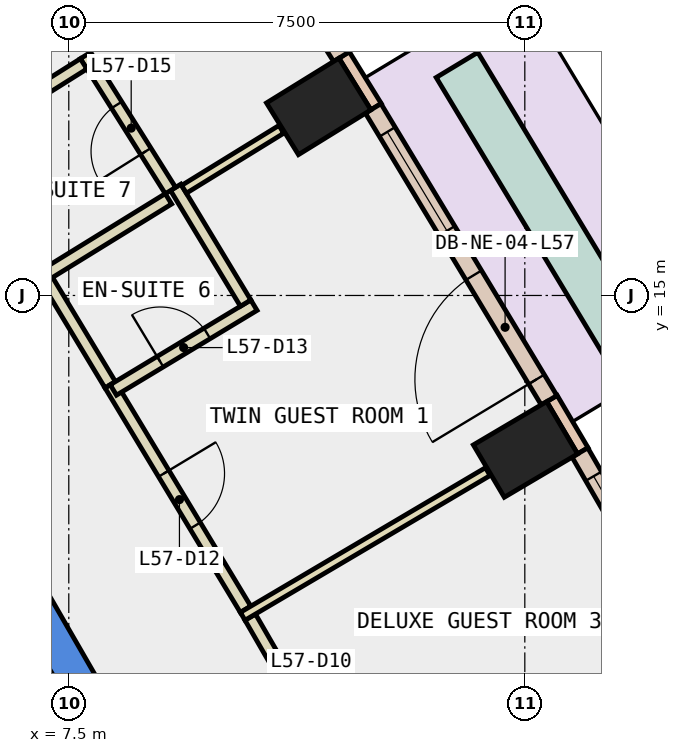
"""IFC4 building model, lengths in metres.
Left out: names, types, materials, properties, quantities, classifications, styles, units other than length and angle.
Written with IfcOpenShell. Run it as: python <this file> out.ifc"""

import sys

from ifc_helpers import new_model, si_unit, direction, frame, frame_2d, origin, origin_2d, place, context, subcontext, project, spatial, polyline, rectangle, outline, extrude, element, fill, save


model = new_model("IFC4")
c1 = context("Model", 3, precision=1e-05, world=origin(), true_north=direction((0.0, 1.0)))
c2 = subcontext(c1, "Body", "Model", "MODEL_VIEW")
j1 = project(units=[si_unit("LENGTHUNIT", "METRE"), si_unit("PLANEANGLEUNIT", "RADIAN")], contexts=[c1])
p1 = place(None, origin())
s1 = spatial("IfcSite", under=j1, at=p1, CompositionType="ELEMENT")
p2 = place(p1, origin())
s2 = spatial("IfcBuilding", under=s1, at=p2, CompositionType="ELEMENT")
p3 = place(p2, frame((0.0, 0.0, 252.2)))
s3 = spatial("IfcBuildingStorey", under=s2, at=p3, CompositionType="ELEMENT", Elevation=252.2)
for number, where, z_axis, x_axis in (
    (1, (15.011, 12.468, -0.34), (0.0, 0.0, 1.0), (-0.509, 0.861, 0.0)),
    (2, (11.61, 18.109, -0.34), (0.0, 0.0, 1.0), (-0.526, 0.851, 0.0)),
):
    element("IfcColumn", number, at=place(p3, frame(where, z_axis=z_axis, x_axis=x_axis)), inside=s3, PredefinedType="COLUMN", context=c2, shape_type="SweptSolid", body=[
        extrude(rectangle(XDim=1.0, YDim=1.4, at=origin_2d()), origin(), (0.0, 0.0, 1.0), 3.6),
    ])
p4 = place(p3, frame((0.0, 0.0, -0.34)))
e3 = element("IfcWall", 3, at=p4, inside=s3, PredefinedType="SHEAR", context=c2, shape_type="SweptSolid", body=[
    extrude(outline(polyline([(6.786, 10.747), (6.266, 10.447), (10.854, 2.5), (11.547, 2.5), (6.786, 10.747)])), origin(), (0.0, 0.0, 1.0), 3.6),
])
p5 = place(p3, frame((15.954, 12.445, 0.0), z_axis=(0.0, 0.0, 1.0), x_axis=(-0.508268432768, 0.861198699634, 0.0)))
e4 = element("IfcWall", 4, at=p5, inside=s3, PredefinedType="STANDARD", context=c2, shape_type="SweptSolid", body=[
    extrude(rectangle(XDim=1.0, YDim=0.2, at=frame_2d((0.5, 0.0))), origin(), (0.0, 0.0, 1.0), 3.26),
])
p6 = place(p3, frame((12.554, 18.104, 0.0), z_axis=(0.0, 0.0, 1.0), x_axis=(-0.525648735675, 0.850701714282, 0.0)))
e5 = element("IfcWall", 5, at=p6, inside=s3, PredefinedType="STANDARD", context=c2, shape_type="SweptSolid", body=[
    extrude(rectangle(XDim=1.0, YDim=0.2, at=frame_2d((0.5, 0.0))), origin(), (0.0, 0.0, 1.0), 3.26),
])
p7 = place(p3, frame((18.708, 7.566, 0.0), z_axis=(0.0, 0.0, 1.0), x_axis=(-0.500089564757, 0.865973687372, 0.0)))
e6 = element("IfcWall", 6, at=p7, inside=s3, PredefinedType="STANDARD", context=c2, shape_type="SweptSolid", body=[
    extrude(rectangle(XDim=5.603, YDim=0.3, at=frame_2d((2.802, 0.0))), origin(), (0.0, 0.0, 1.0), 3.26),
])
p8 = place(p7, frame((0.451, 0.0, 0.9)))
e7 = element("IfcOpeningElement", 7, at=p8, cuts=e6, PredefinedType="OPENING", context=c2, shape_type="SweptSolid", body=[
    extrude(rectangle(XDim=1.9, YDim=2.0, at=frame_2d((0.95, 1.0))), frame((0.0, 0.16, 0.0), z_axis=(0.0, -1.0, 0.0), x_axis=(1.0, 0.0, 0.0)), (0.0, 0.0, 1.0), 0.32),
])
p9 = place(p7, frame((3.252, 0.0, 0.9)))
e8 = element("IfcOpeningElement", 8, at=p9, cuts=e6, PredefinedType="OPENING", context=c2, shape_type="SweptSolid", body=[
    extrude(rectangle(XDim=1.9, YDim=2.0, at=frame_2d((0.95, 1.0))), frame((0.0, 0.16, 0.0), z_axis=(0.0, -1.0, 0.0), x_axis=(1.0, 0.0, 0.0)), (0.0, 0.0, 1.0), 0.32),
])
p10 = place(p3, frame((15.399, 13.277, 0.0), z_axis=(0.0, 0.0, 1.0), x_axis=(-0.516269519619, 0.856426169096, 0.0)))
e9 = element("IfcWall", 9, at=p10, inside=s3, PredefinedType="STANDARD", context=c2, shape_type="SweptSolid", body=[
    extrude(rectangle(XDim=5.603, YDim=0.3, at=frame_2d((2.802, 0.0))), origin(), (0.0, 0.0, 1.0), 3.26),
])
p11 = place(p10, frame((0.401, 0.0, 0.0)))
e10 = element("IfcOpeningElement", 10, at=p11, cuts=e9, PredefinedType="OPENING", context=c2, shape_type="SweptSolid", body=[
    extrude(rectangle(XDim=2.0, YDim=2.4, at=frame_2d((1.0, 1.2))), frame((0.0, 0.16, 0.0), z_axis=(0.0, -1.0, 0.0), x_axis=(1.0, 0.0, 0.0)), (0.0, 0.0, 1.0), 0.32),
])
p12 = place(p10, frame((3.253, 0.0, 0.9)))
e11 = element("IfcOpeningElement", 11, at=p12, cuts=e9, PredefinedType="OPENING", context=c2, shape_type="SweptSolid", body=[
    extrude(rectangle(XDim=1.9, YDim=2.0, at=frame_2d((0.95, 1.0))), frame((0.0, 0.16, 0.0), z_axis=(0.0, -1.0, 0.0), x_axis=(1.0, 0.0, 0.0)), (0.0, 0.0, 1.0), 0.32),
])
p13 = place(p3, frame((11.983, 18.926, 0.0), z_axis=(0.0, 0.0, 1.0), x_axis=(-0.532558226688, 0.846393369059, 0.0)))
e12 = element("IfcWall", 12, at=p13, inside=s3, PredefinedType="STANDARD", context=c2, shape_type="SweptSolid", body=[
    extrude(rectangle(XDim=5.637, YDim=0.3, at=frame_2d((2.818, 0.0))), origin(), (0.0, 0.0, 1.0), 3.26),
])
p14 = place(p13, frame((0.459, 0.0, 0.9)))
e13 = element("IfcOpeningElement", 13, at=p14, cuts=e12, PredefinedType="OPENING", context=c2, shape_type="SweptSolid", body=[
    extrude(rectangle(XDim=1.9, YDim=2.0, at=frame_2d((0.95, 1.0))), frame((0.0, 0.16, 0.0), z_axis=(0.0, -1.0, 0.0), x_axis=(1.0, 0.0, 0.0)), (0.0, 0.0, 1.0), 0.32),
])
p15 = place(p13, frame((3.278, 0.0, 0.9)))
e14 = element("IfcOpeningElement", 14, at=p15, cuts=e12, PredefinedType="OPENING", context=c2, shape_type="SweptSolid", body=[
    extrude(rectangle(XDim=1.9, YDim=2.0, at=frame_2d((0.95, 1.0))), frame((0.0, 0.16, 0.0), z_axis=(0.0, -1.0, 0.0), x_axis=(1.0, 0.0, 0.0)), (0.0, 0.0, 1.0), 0.32),
])
p16 = place(p3, frame((16.675, 14.163, 0.0), z_axis=(0.0, 0.0, 1.0), x_axis=(-0.516301759386, 0.856406733542, 0.0)))
e15 = element("IfcWall", 15, at=p16, inside=s3, PredefinedType="STANDARD", context=c2, shape_type="SweptSolid", body=[
    extrude(rectangle(XDim=5.404, YDim=0.8, at=frame_2d((2.702, 0.0))), origin(), (0.0, 0.0, 1.0), 0.8),
])
p17 = place(p3, frame((10.484, 9.71, 0.0), z_axis=(0.0, 0.0, 1.0), x_axis=(0.500034145141, -0.866005689181, 0.0)))
e16 = element("IfcWall", 16, at=p17, inside=s3, PredefinedType="PARTITIONING", context=c2, shape_type="SweptSolid", body=[
    extrude(rectangle(XDim=3.91, YDim=0.2, at=frame_2d((1.955, 0.0))), origin(), (0.0, 0.0, 1.0), 3.26),
])
p18 = place(p17, frame((1.505, 0.0, 0.0)))
e17 = element("IfcOpeningElement", 17, at=p18, cuts=e16, PredefinedType="OPENING", context=c2, shape_type="SweptSolid", body=[
    extrude(rectangle(XDim=1.0, YDim=2.1, at=frame_2d((0.5, 1.05))), frame((0.0, 0.11, 0.0), z_axis=(0.0, -1.0, 0.0), x_axis=(1.0, 0.0, 0.0)), (0.0, 0.0, 1.0), 0.22),
])
p19 = place(p3, frame((8.181, 13.532, 0.0), z_axis=(0.0, 0.0, 1.0), x_axis=(0.51625987265, -0.856431984393, 0.0)))
e18 = element("IfcWall", 18, at=p19, inside=s3, PredefinedType="PARTITIONING", context=c2, shape_type="SweptSolid", body=[
    extrude(rectangle(XDim=4.312, YDim=0.2, at=frame_2d((2.156, 0.0))), origin(), (0.0, 0.0, 1.0), 3.26),
])
p20 = place(p19, frame((1.706, 0.0, 0.0)))
e19 = element("IfcOpeningElement", 19, at=p20, cuts=e18, PredefinedType="OPENING", context=c2, shape_type="SweptSolid", body=[
    extrude(rectangle(XDim=1.0, YDim=2.1, at=frame_2d((0.5, 1.05))), frame((0.0, 0.11, 0.0), z_axis=(0.0, -1.0, 0.0), x_axis=(1.0, 0.0, 0.0)), (0.0, 0.0, 1.0), 0.22),
])
p21 = place(p3, frame((7.148, 15.245, 0.0), z_axis=(0.0, 0.0, 1.0), x_axis=(0.516361066184, -0.856370976463, 0.0)))
e20 = element("IfcWall", 20, at=p21, inside=s3, PredefinedType="PARTITIONING", context=c2, shape_type="SweptSolid", body=[
    extrude(rectangle(XDim=2.0, YDim=0.2, at=frame_2d((1.0, 0.0))), origin(), (0.0, 0.0, 1.0), 3.26),
])
p22 = place(p3, frame((5.766, 17.446, 0.0), z_axis=(0.0, 0.0, 1.0), x_axis=(0.532437006176, -0.846469629966, 0.0)))
e21 = element("IfcWall", 21, at=p22, inside=s3, PredefinedType="PARTITIONING", context=c2, shape_type="SweptSolid", body=[
    extrude(rectangle(XDim=2.599, YDim=0.2, at=frame_2d((1.299, 0.0))), origin(), (0.0, 0.0, 1.0), 3.26),
])
p23 = place(p3, frame((10.36, 9.724, 0.0), z_axis=(0.0, 0.0, 1.0), x_axis=(0.861211954005, 0.508245974188, 0.0)))
e22 = element("IfcWall", 22, at=p23, inside=s3, PredefinedType="PARTITIONING", context=c2, shape_type="SweptSolid", body=[
    extrude(rectangle(XDim=4.681, YDim=0.15, at=frame_2d((2.34, 0.0))), origin(), (0.0, 0.0, 1.0), 3.26),
])
p24 = place(p3, frame((8.233, 13.446, 0.0), z_axis=(0.0, 0.0, 1.0), x_axis=(0.856373825811, 0.516356340589, 0.0)))
e23 = element("IfcWall", 23, at=p24, inside=s3, PredefinedType="PARTITIONING", context=c2, shape_type="SweptSolid", body=[
    extrude(rectangle(XDim=2.7, YDim=0.2, at=frame_2d((1.35, 0.0))), origin(), (0.0, 0.0, 1.0), 3.26),
])
p25 = place(p24, frame((0.9, 0.0, 0.0)))
e24 = element("IfcOpeningElement", 24, at=p25, cuts=e23, PredefinedType="OPENING", context=c2, shape_type="SweptSolid", body=[
    extrude(rectangle(XDim=0.9, YDim=2.1, at=frame_2d((0.45, 1.05))), frame((0.0, 0.11, 0.0), z_axis=(0.0, -1.0, 0.0), x_axis=(1.0, 0.0, 0.0)), (0.0, 0.0, 1.0), 0.22),
])
p26 = place(p3, frame((10.408, 14.874, 0.0), z_axis=(0.0, 0.0, 1.0), x_axis=(-0.516768967276, 0.856124894195, 0.0)))
e25 = element("IfcWall", 25, at=p26, inside=s3, PredefinedType="PARTITIONING", context=c2, shape_type="SweptSolid", body=[
    extrude(rectangle(XDim=2.225, YDim=0.2, at=frame_2d((1.113, 0.0))), origin(), (0.0, 0.0, 1.0), 3.26),
])
p27 = place(p3, frame((9.395, 16.746, 0.0), z_axis=(0.0, 0.0, 1.0), x_axis=(0.851524542888, 0.524314745987, 0.0)))
e26 = element("IfcWall", 26, at=p27, inside=s3, PredefinedType="PARTITIONING", context=c2, shape_type="SweptSolid", body=[
    extrude(rectangle(XDim=1.88, YDim=0.15, at=frame_2d((0.94, 0.0))), origin(), (0.0, 0.0, 1.0), 3.26),
])
p28 = place(p3, frame((7.097, 15.33, 0.0), z_axis=(0.0, 0.0, 1.0), x_axis=(0.851207242031, 0.524829716302, 0.0)))
e27 = element("IfcWall", 27, at=p28, inside=s3, PredefinedType="PARTITIONING", context=c2, shape_type="SweptSolid", body=[
    extrude(rectangle(XDim=2.399, YDim=0.2, at=frame_2d((1.199, 0.0))), origin(), (0.0, 0.0, 1.0), 3.26),
])
p29 = place(p3, frame((9.172, 16.725, 0.0), z_axis=(0.0, 0.0, 1.0), x_axis=(-0.532329646536, 0.846537150643, 0.0)))
e28 = element("IfcWall", 28, at=p29, inside=s3, PredefinedType="PARTITIONING", context=c2, shape_type="SweptSolid", body=[
    extrude(rectangle(XDim=2.625, YDim=0.2, at=frame_2d((1.312, 0.0))), origin(), (0.0, 0.0, 1.0), 3.26),
])
p30 = place(p29, frame((0.763, 0.0, 0.0)))
e29 = element("IfcOpeningElement", 29, at=p30, cuts=e28, PredefinedType="OPENING", context=c2, shape_type="SweptSolid", body=[
    extrude(rectangle(XDim=0.9, YDim=2.1, at=frame_2d((0.45, 1.05))), frame((0.0, 0.11, 0.0), z_axis=(0.0, -1.0, 0.0), x_axis=(1.0, 0.0, 0.0)), (0.0, 0.0, 1.0), 0.22),
])
p31 = place(p3, frame((7.744, 18.809, 0.0), z_axis=(0.0, 0.0, 1.0), x_axis=(-0.846360434059, -0.532610566605, 0.0)))
e30 = element("IfcWall", 30, at=p31, inside=s3, PredefinedType="PARTITIONING", context=c2, shape_type="SweptSolid", body=[
    extrude(rectangle(XDim=2.3, YDim=0.2, at=frame_2d((1.15, 0.0))), origin(), (0.0, 0.0, 1.0), 3.26),
])
p32 = place(p3, frame((8.48, 3.412, 0.0), z_axis=(0.0, 0.0, 1.0), x_axis=(-0.499978703459, 0.866037698999, 0.0)))
e31 = element("IfcWall", 31, at=p32, inside=s3, PredefinedType="STANDARD", context=c2, shape_type="SweptSolid", body=[
    extrude(rectangle(XDim=6.9, YDim=0.2, at=frame_2d((3.45, 0.0))), origin(), (0.0, 0.0, 1.0), 3.26),
])
p33 = place(p9, origin())
e32 = element("IfcWindow", 32, at=p33, inside=s3, PartitioningType="SINGLE_PANEL", PredefinedType="WINDOW", context=c2, shape_type="SweptSolid", body=[
    extrude(rectangle(XDim=1.9, YDim=2.0, at=frame_2d((0.95, 1.0))), frame((0.0, 0.03, 0.0), z_axis=(0.0, -1.0, 0.0), x_axis=(1.0, 0.0, 0.0)), (0.0, 0.0, 1.0), 0.06),
])
fill(e8, e32)
p34 = place(p11, origin())
e33 = element("IfcDoor", 33, at=p34, inside=s3, OperationType="SLIDING_TO_LEFT", PredefinedType="DOOR", context=c2, shape_type="SweptSolid", body=[
    extrude(rectangle(XDim=2.0, YDim=2.4, at=frame_2d((1.0, 1.2))), frame((0.0, 0.025, 0.0), z_axis=(0.0, -1.0, 0.0), x_axis=(1.0, 0.0, 0.0)), (0.0, 0.0, 1.0), 0.05),
])
fill(e10, e33)
p35 = place(p12, origin())
e34 = element("IfcWindow", 34, at=p35, inside=s3, PartitioningType="SINGLE_PANEL", PredefinedType="WINDOW", context=c2, shape_type="SweptSolid", body=[
    extrude(rectangle(XDim=1.9, YDim=2.0, at=frame_2d((0.95, 1.0))), frame((0.0, 0.03, 0.0), z_axis=(0.0, -1.0, 0.0), x_axis=(1.0, 0.0, 0.0)), (0.0, 0.0, 1.0), 0.06),
])
fill(e11, e34)
p36 = place(p20, origin())
e35 = element("IfcDoor", 35, at=p36, inside=s3, OperationType="SINGLE_SWING_LEFT", PredefinedType="DOOR", context=c2, shape_type="SweptSolid", body=[
    extrude(rectangle(XDim=1.0, YDim=2.1, at=frame_2d((0.5, 1.05))), frame((0.0, 0.025, 0.0), z_axis=(0.0, -1.0, 0.0), x_axis=(1.0, 0.0, 0.0)), (0.0, 0.0, 1.0), 0.05),
])
fill(e19, e35)
p37 = place(p25, origin())
e36 = element("IfcDoor", 36, at=p37, inside=s3, OperationType="SINGLE_SWING_LEFT", PredefinedType="DOOR", context=c2, shape_type="SweptSolid", body=[
    extrude(rectangle(XDim=0.9, YDim=2.1, at=frame_2d((0.45, 1.05))), frame((0.0, 0.025, 0.0), z_axis=(0.0, -1.0, 0.0), x_axis=(1.0, 0.0, 0.0)), (0.0, 0.0, 1.0), 0.05),
])
fill(e24, e36)
p38 = place(p30, origin())
e37 = element("IfcDoor", 37, at=p38, inside=s3, OperationType="SINGLE_SWING_LEFT", PredefinedType="DOOR", context=c2, shape_type="SweptSolid", body=[
    extrude(rectangle(XDim=0.9, YDim=2.1, at=frame_2d((0.45, 1.05))), frame((0.0, 0.025, 0.0), z_axis=(0.0, -1.0, 0.0), x_axis=(1.0, 0.0, 0.0)), (0.0, 0.0, 1.0), 0.05),
])
fill(e29, e37)
save(model, sys.argv[1])
